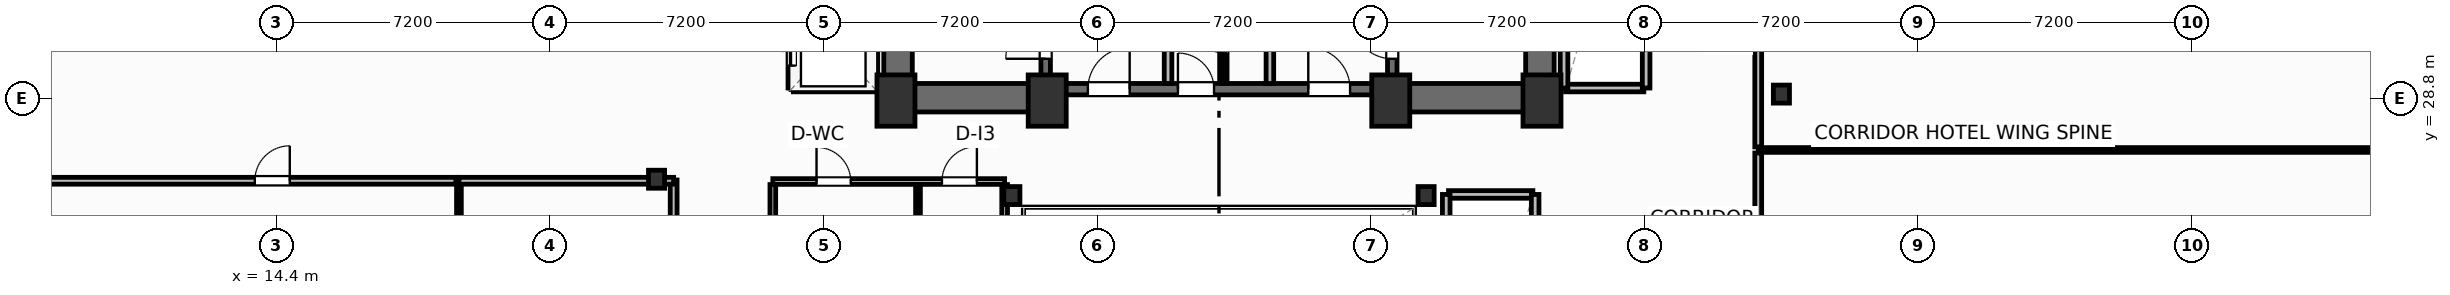
"""IFC4 building model, lengths in metres.
Left out: names, types, materials, properties, quantities, classifications, styles, units other than length and angle.
Written with IfcOpenShell. Run it as: python <this file> out.ifc"""

import sys

from ifc_helpers import new_model, si_unit, direction, frame, frame_2d, origin, origin_2d, place, context, subcontext, project, spatial, rectangle, i_section, extrude, element, fill, save


model = new_model("IFC4")
c1 = context("Model", 3, precision=1e-05, world=origin(), true_north=direction((0.0, 1.0)))
c2 = subcontext(c1, "Body", "Model", "MODEL_VIEW")
j1 = project(units=[si_unit("LENGTHUNIT", "METRE"), si_unit("PLANEANGLEUNIT", "RADIAN")], contexts=[c1])
p1 = place(None, origin())
s1 = spatial("IfcSite", under=j1, at=p1, CompositionType="ELEMENT")
p2 = place(p1, origin())
s2 = spatial("IfcBuilding", under=s1, at=p2, CompositionType="ELEMENT")
p3 = place(p2, frame((0.0, 0.0, 91.0)))
s3 = spatial("IfcBuildingStorey", under=s2, at=p3, CompositionType="ELEMENT", Elevation=91.0)
for number, where, z_axis, x_axis in (
    (1, (30.7, 28.75, 0.0), (0.0, 0.0, 1.0), (1.0, 0.0, 0.0)),
    (2, (34.68, 28.75, 0.0), (0.0, 0.0, 1.0), (1.0, 0.0, 0.0)),
    (3, (43.72, 28.75, 0.0), (0.0, 0.0, 1.0), (1.0, 0.0, 0.0)),
    (4, (47.7, 28.75, 0.0), (0.0, 0.0, 1.0), (1.0, 0.0, 0.0)),
):
    element("IfcColumn", number, at=place(p3, frame(where, z_axis=z_axis, x_axis=x_axis)), inside=s3, PredefinedType="COLUMN", context=c2, shape_type="SweptSolid", body=[
        extrude(rectangle(XDim=1.0, YDim=1.35, at=origin_2d()), origin(), (0.0, 0.0, 1.0), 3.7),
    ])
for number, where, z_axis, x_axis in (
    (5, (33.75, 26.25, 0.0), (0.0, 0.0, 1.0), (1.0, 0.0, 0.0)),
    (6, (44.65, 26.25, 0.0), (0.0, 0.0, 1.0), (1.0, 0.0, 0.0)),
    (7, (24.4, 26.68, 0.0), (0.0, 0.0, 1.0), (1.0, 0.0, 0.0)),
    (8, (54.0, 28.92, 0.0), (0.0, 0.0, 1.0), (1.0, 0.0, 0.0)),
):
    element("IfcColumn", number, at=place(p3, frame(where, z_axis=z_axis, x_axis=x_axis)), inside=s3, PredefinedType="COLUMN", context=c2, shape_type="SweptSolid", body=[
        extrude(i_section(OverallWidth=0.424, OverallDepth=0.474, WebThickness=0.048, FlangeThickness=0.077, FilletRadius=0.025, at=origin_2d()), origin(), (0.0, 0.0, 1.0), 3.7),
    ])
for number, where, z_axis, x_axis in (
    (9, (30.755, 29.2, 0.0), (0.0, 0.0, 1.0), (0.0, 1.0, 0.0)),
    (10, (47.645, 29.2, 0.0), (0.0, 0.0, 1.0), (0.0, 1.0, 0.0)),
):
    element("IfcWall", number, at=place(p3, frame(where, z_axis=z_axis, x_axis=x_axis)), inside=s3, PredefinedType="SHEAR", context=c2, shape_type="SweptSolid", body=[
        extrude(rectangle(XDim=9.22, YDim=0.75, at=frame_2d((4.61, 0.0))), origin(), (0.0, 0.0, 1.0), 3.45),
    ])
p4 = place(p3, frame((30.38, 28.825, 0.0), z_axis=(0.0, 0.0, 1.0), x_axis=(1.0, 0.0, 0.0)))
e11 = element("IfcWall", 11, at=p4, inside=s3, PredefinedType="SHEAR", context=c2, shape_type="SweptSolid", body=[
    extrude(rectangle(XDim=4.42, YDim=0.75, at=frame_2d((2.21, 0.0))), origin(), (0.0, 0.0, 1.0), 3.45),
])
p5 = place(p3, frame((43.6, 28.825, 0.0), z_axis=(0.0, 0.0, 1.0), x_axis=(1.0, 0.0, 0.0)))
e12 = element("IfcWall", 12, at=p5, inside=s3, PredefinedType="SHEAR", context=c2, shape_type="SweptSolid", body=[
    extrude(rectangle(XDim=4.42, YDim=0.75, at=frame_2d((2.21, 0.0))), origin(), (0.0, 0.0, 1.0), 3.45),
])
p6 = place(p3, frame((34.8, 29.05, 0.0), z_axis=(0.0, 0.0, 1.0), x_axis=(1.0, 0.0, 0.0)))
e13 = element("IfcWall", 13, at=p6, inside=s3, PredefinedType="SHEAR", context=c2, shape_type="SweptSolid", body=[
    extrude(rectangle(XDim=8.8, YDim=0.3, at=frame_2d((4.4, 0.0))), origin(), (0.0, 0.0, 1.0), 3.45),
])
p7 = place(p6, frame((0.95, 0.0, 0.0)))
e14 = element("IfcOpeningElement", 14, at=p7, cuts=e13, PredefinedType="OPENING", context=c2, shape_type="SweptSolid", body=[
    extrude(rectangle(XDim=1.1, YDim=2.15, at=frame_2d((0.55, 1.075))), frame((0.0, 0.16, 0.0), z_axis=(0.0, -1.0, 0.0), x_axis=(1.0, 0.0, 0.0)), (0.0, 0.0, 1.0), 0.32),
])
p8 = place(p6, frame((6.75, 0.0, 0.0)))
e15 = element("IfcOpeningElement", 15, at=p8, cuts=e13, PredefinedType="OPENING", context=c2, shape_type="SweptSolid", body=[
    extrude(rectangle(XDim=1.1, YDim=2.15, at=frame_2d((0.55, 1.075))), frame((0.0, 0.16, 0.0), z_axis=(0.0, -1.0, 0.0), x_axis=(1.0, 0.0, 0.0)), (0.0, 0.0, 1.0), 0.32),
])
p9 = place(p6, frame((3.32, 0.0, 0.0)))
e16 = element("IfcOpeningElement", 16, at=p9, cuts=e13, PredefinedType="OPENING", context=c2, shape_type="SweptSolid", body=[
    extrude(rectangle(XDim=0.95, YDim=2.15, at=frame_2d((0.475, 1.075))), frame((0.0, 0.16, 0.0), z_axis=(0.0, -1.0, 0.0), x_axis=(1.0, 0.0, 0.0)), (0.0, 0.0, 1.0), 0.32),
])
p10 = place(p3, frame((34.64, 29.2, 0.0), z_axis=(0.0, 0.0, 1.0), x_axis=(0.0, 1.0, 0.0)))
e17 = element("IfcWall", 17, at=p10, inside=s3, PredefinedType="SHEAR", context=c2, shape_type="SweptSolid", body=[
    extrude(rectangle(XDim=9.22, YDim=0.25, at=frame_2d((4.61, 0.0))), origin(), (0.0, 0.0, 1.0), 3.45),
])
p11 = place(p10, frame((0.65, 0.0, 0.0)))
e18 = element("IfcOpeningElement", 18, at=p11, cuts=e17, PredefinedType="OPENING", context=c2, shape_type="SweptSolid", body=[
    extrude(rectangle(XDim=1.05, YDim=2.15, at=frame_2d((0.525, 1.075))), frame((0.0, 0.135, 0.0), z_axis=(0.0, -1.0, 0.0), x_axis=(1.0, 0.0, 0.0)), (0.0, 0.0, 1.0), 0.27),
])
p12 = place(p3, frame((43.76, 29.2, 0.0), z_axis=(0.0, 0.0, 1.0), x_axis=(0.0, 1.0, 0.0)))
e19 = element("IfcWall", 19, at=p12, inside=s3, PredefinedType="SHEAR", context=c2, shape_type="SweptSolid", body=[
    extrude(rectangle(XDim=9.22, YDim=0.25, at=frame_2d((4.61, 0.0))), origin(), (0.0, 0.0, 1.0), 3.45),
])
p13 = place(p12, frame((0.65, 0.0, 0.0)))
e20 = element("IfcOpeningElement", 20, at=p13, cuts=e19, PredefinedType="OPENING", context=c2, shape_type="SweptSolid", body=[
    extrude(rectangle(XDim=1.05, YDim=2.15, at=frame_2d((0.525, 1.075))), frame((0.0, 0.135, 0.0), z_axis=(0.0, -1.0, 0.0), x_axis=(1.0, 0.0, 0.0)), (0.0, 0.0, 1.0), 0.27),
])
p14 = place(p3, frame((-0.094, 26.64, 0.0), z_axis=(0.0, 0.0, 1.0), x_axis=(1.0, 0.0, 0.0)))
e21 = element("IfcWall", 21, at=p14, inside=s3, PredefinedType="PARTITIONING", context=c2, shape_type="SweptSolid", body=[
    extrude(rectangle(XDim=19.214, YDim=0.18, at=frame_2d((9.607, 0.0))), origin(), (0.0, 0.0, 1.0), 3.45),
])
p15 = place(p14, frame((13.923, 0.0, 0.0)))
e22 = element("IfcOpeningElement", 22, at=p15, cuts=e21, PredefinedType="OPENING", context=c2, shape_type="SweptSolid", body=[
    extrude(rectangle(XDim=0.92, YDim=2.05, at=frame_2d((0.46, 1.025))), frame((0.0, 0.1, 0.0), z_axis=(0.0, -1.0, 0.0), x_axis=(1.0, 0.0, 0.0)), (0.0, 0.0, 1.0), 0.2),
])
p16 = place(p3, frame((24.85, 19.24, 0.0), z_axis=(0.0, 0.0, 1.0), x_axis=(0.0, 1.0, 0.0)))
e23 = element("IfcWall", 23, at=p16, inside=s3, PredefinedType="PARTITIONING", context=c2, shape_type="SweptSolid", body=[
    extrude(rectangle(XDim=7.42, YDim=0.18, at=frame_2d((3.71, 0.0))), origin(), (0.0, 0.0, 1.0), 3.45),
])
p17 = place(p16, frame((2.4, 0.0, 0.0)))
e24 = element("IfcOpeningElement", 24, at=p17, cuts=e23, PredefinedType="OPENING", context=c2, shape_type="SweptSolid", body=[
    extrude(rectangle(XDim=0.92, YDim=2.05, at=frame_2d((0.46, 1.025))), frame((0.0, 0.1, 0.0), z_axis=(0.0, -1.0, 0.0), x_axis=(1.0, 0.0, 0.0)), (0.0, 0.0, 1.0), 0.2),
])
p18 = place(p3, frame((19.2, 19.24, 0.0), z_axis=(0.0, 0.0, 1.0), x_axis=(0.0, 1.0, 0.0)))
e25 = element("IfcWall", 25, at=p18, inside=s3, PredefinedType="PARTITIONING", context=c2, shape_type="SweptSolid", body=[
    extrude(rectangle(XDim=7.42, YDim=0.125, at=frame_2d((3.71, 0.0))), origin(), (0.0, 0.0, 1.0), 3.45),
])
p19 = place(p3, frame((19.2, 26.64, 0.0), z_axis=(0.0, 0.0, 1.0), x_axis=(1.0, 0.0, 0.0)))
e26 = element("IfcWall", 26, at=p19, inside=s3, PredefinedType="PARTITIONING", context=c2, shape_type="SweptSolid", body=[
    extrude(rectangle(XDim=5.65, YDim=0.18, at=frame_2d((2.825, 0.0))), origin(), (0.0, 0.0, 1.0), 2.662),
])
p20 = place(p3, frame((53.39, 19.3, 0.0), z_axis=(0.0, 0.0, 1.0), x_axis=(0.0, 1.0, 0.0)))
e27 = element("IfcWall", 27, at=p20, inside=s3, PredefinedType="PARTITIONING", context=c2, shape_type="SweptSolid", body=[
    extrude(rectangle(XDim=8.07, YDim=0.18, at=frame_2d((4.035, 0.0))), origin(), (0.0, 0.0, 1.0), 3.45),
])
p21 = place(p20, frame((2.2, 0.0, 0.0)))
e28 = element("IfcOpeningElement", 28, at=p21, cuts=e27, PredefinedType="OPENING", context=c2, shape_type="SweptSolid", body=[
    extrude(rectangle(XDim=0.92, YDim=2.05, at=frame_2d((0.46, 1.025))), frame((0.0, 0.1, 0.0), z_axis=(0.0, -1.0, 0.0), x_axis=(1.0, 0.0, 0.0)), (0.0, 0.0, 1.0), 0.2),
])
p22 = place(p3, frame((53.39, 27.53, 0.0), z_axis=(0.0, 0.0, 1.0), x_axis=(0.0, 1.0, 0.0)))
e29 = element("IfcWall", 29, at=p22, inside=s3, PredefinedType="PARTITIONING", context=c2, shape_type="SweptSolid", body=[
    extrude(rectangle(XDim=11.67, YDim=0.18, at=frame_2d((5.835, 0.0))), origin(), (0.0, 0.0, 1.0), 3.45),
])
p23 = place(p22, frame((5.8, 0.0, 0.0)))
e30 = element("IfcOpeningElement", 30, at=p23, cuts=e29, PredefinedType="OPENING", context=c2, shape_type="SweptSolid", body=[
    extrude(rectangle(XDim=0.92, YDim=2.05, at=frame_2d((0.46, 1.025))), frame((0.0, 0.1, 0.0), z_axis=(0.0, -1.0, 0.0), x_axis=(1.0, 0.0, 0.0)), (0.0, 0.0, 1.0), 0.2),
])
p24 = place(p3, frame((53.39, 27.45, 0.0), z_axis=(0.0, 0.0, 1.0), x_axis=(1.0, 0.0, 0.0)))
e31 = element("IfcWall", 31, at=p24, inside=s3, PredefinedType="PARTITIONING", context=c2, shape_type="SweptSolid", body=[
    extrude(rectangle(XDim=23.61, YDim=0.125, at=frame_2d((11.805, 0.0))), origin(), (0.0, 0.0, 1.0), 3.45),
])
for number, where, z_axis, x_axis in (
    (32, (37.86, 29.2, 0.0), (0.0, 0.0, 1.0), (0.0, 1.0, 0.0)),
    (33, (40.54, 29.2, 0.0), (0.0, 0.0, 1.0), (0.0, 1.0, 0.0)),
):
    element("IfcWall", number, at=place(p3, frame(where, z_axis=z_axis, x_axis=x_axis)), inside=s3, PredefinedType="PARTITIONING", context=c2, shape_type="SweptSolid", body=[
        extrude(rectangle(XDim=5.18, YDim=0.2, at=frame_2d((2.59, 0.0))), origin(), (0.0, 0.0, 1.0), 3.45),
    ])
p25 = place(p3, frame((39.35, 29.2, 0.0), z_axis=(0.0, 0.0, 1.0), x_axis=(0.0, 1.0, 0.0)))
e34 = element("IfcWall", 34, at=p25, inside=s3, PredefinedType="PARTITIONING", context=c2, shape_type="SweptSolid", body=[
    extrude(rectangle(XDim=5.22, YDim=0.125, at=frame_2d((2.61, 0.0))), origin(), (0.0, 0.0, 1.0), 3.45),
])
p26 = place(p25, frame((0.8, 0.0, 0.0)))
e35 = element("IfcOpeningElement", 35, at=p26, cuts=e34, PredefinedType="OPENING", context=c2, shape_type="SweptSolid", body=[
    extrude(rectangle(XDim=0.85, YDim=2.05, at=frame_2d((0.425, 1.025))), frame((0.0, 0.073, 0.0), z_axis=(0.0, -1.0, 0.0), x_axis=(1.0, 0.0, 0.0)), (0.0, 0.0, 1.0), 0.145),
])
p27 = place(p25, frame((3.4, 0.0, 0.0)))
e36 = element("IfcOpeningElement", 36, at=p27, cuts=e34, PredefinedType="OPENING", context=c2, shape_type="SweptSolid", body=[
    extrude(rectangle(XDim=0.85, YDim=2.05, at=frame_2d((0.425, 1.025))), frame((0.0, 0.073, 0.0), z_axis=(0.0, -1.0, 0.0), x_axis=(1.0, 0.0, 0.0)), (0.0, 0.0, 1.0), 0.145),
])
p28 = place(p3, frame((27.46, 26.62, 0.0), z_axis=(0.0, 0.0, 1.0), x_axis=(1.0, 0.0, 0.0)))
e37 = element("IfcWall", 37, at=p28, inside=s3, PredefinedType="PARTITIONING", context=c2, shape_type="SweptSolid", body=[
    extrude(rectangle(XDim=6.1, YDim=0.15, at=frame_2d((3.05, 0.0))), origin(), (0.0, 0.0, 1.0), 2.662),
])
p29 = place(p28, frame((1.15, 0.0, 0.0)))
e38 = element("IfcOpeningElement", 38, at=p29, cuts=e37, PredefinedType="OPENING", context=c2, shape_type="SweptSolid", body=[
    extrude(rectangle(XDim=0.9, YDim=2.05, at=frame_2d((0.45, 1.025))), frame((0.0, 0.085, 0.0), z_axis=(0.0, -1.0, 0.0), x_axis=(1.0, 0.0, 0.0)), (0.0, 0.0, 1.0), 0.17),
])
p30 = place(p28, frame((4.45, 0.0, 0.0)))
e39 = element("IfcOpeningElement", 39, at=p30, cuts=e37, PredefinedType="OPENING", context=c2, shape_type="SweptSolid", body=[
    extrude(rectangle(XDim=0.92, YDim=2.05, at=frame_2d((0.46, 1.025))), frame((0.0, 0.085, 0.0), z_axis=(0.0, -1.0, 0.0), x_axis=(1.0, 0.0, 0.0)), (0.0, 0.0, 1.0), 0.17),
])
p31 = place(p3, frame((31.28, 19.38, 0.0), z_axis=(0.0, 0.0, 1.0), x_axis=(0.0, 1.0, 0.0)))
e40 = element("IfcWall", 40, at=p31, inside=s3, PredefinedType="PARTITIONING", context=c2, shape_type="SweptSolid", body=[
    extrude(rectangle(XDim=7.16, YDim=0.125, at=frame_2d((3.58, 0.0))), origin(), (0.0, 0.0, 1.0), 3.45),
])
p32 = place(p3, frame((27.46, 19.38, 0.0), z_axis=(0.0, 0.0, 1.0), x_axis=(0.0, 1.0, 0.0)))
e41 = element("IfcWall", 41, at=p32, inside=s3, PredefinedType="PARTITIONING", context=c2, shape_type="SweptSolid", body=[
    extrude(rectangle(XDim=7.16, YDim=0.15, at=frame_2d((3.58, 0.0))), origin(), (0.0, 0.0, 1.0), 3.45),
])
p33 = place(p32, frame((1.4, 0.0, 0.0)))
e42 = element("IfcOpeningElement", 42, at=p33, cuts=e41, PredefinedType="OPENING", context=c2, shape_type="SweptSolid", body=[
    extrude(rectangle(XDim=0.95, YDim=2.05, at=frame_2d((0.475, 1.025))), frame((0.0, 0.085, 0.0), z_axis=(0.0, -1.0, 0.0), x_axis=(1.0, 0.0, 0.0)), (0.0, 0.0, 1.0), 0.17),
])
p34 = place(p3, frame((33.56, 19.38, 0.0), z_axis=(0.0, 0.0, 1.0), x_axis=(0.0, 1.0, 0.0)))
e43 = element("IfcWall", 43, at=p34, inside=s3, PredefinedType="PARTITIONING", context=c2, shape_type="SweptSolid", body=[
    extrude(rectangle(XDim=7.16, YDim=0.15, at=frame_2d((3.58, 0.0))), origin(), (0.0, 0.0, 1.0), 2.824),
])
p35 = place(p3, frame((28.0, 29.08, 0.0), z_axis=(0.0, 0.0, 1.0), x_axis=(1.0, 0.0, 0.0)))
e44 = element("IfcWall", 44, at=p35, inside=s3, PredefinedType="PARTITIONING", context=c2, shape_type="SweptSolid", body=[
    extrude(rectangle(XDim=2.1, YDim=0.2, at=frame_2d((1.05, 0.0))), origin(), (0.0, 0.0, 1.0), 3.45),
])
p36 = place(p3, frame((30.12, 29.08, 0.0), z_axis=(0.0, 0.0, 1.0), x_axis=(0.0, 1.0, 0.0)))
e45 = element("IfcWall", 45, at=p36, inside=s3, PredefinedType="PARTITIONING", context=c2, shape_type="SweptSolid", body=[
    extrude(rectangle(XDim=6.89, YDim=0.2, at=frame_2d((3.445, 0.0))), origin(), (0.0, 0.0, 1.0), 3.45),
])
p37 = place(p3, frame((27.96, 29.08, 0.0), z_axis=(0.0, 0.0, 1.0), x_axis=(0.0, 1.0, 0.0)))
e46 = element("IfcWall", 46, at=p37, inside=s3, PredefinedType="PARTITIONING", context=c2, shape_type="SweptSolid", body=[
    extrude(rectangle(XDim=6.89, YDim=0.2, at=frame_2d((3.445, 0.0))), origin(), (0.0, 0.0, 1.0), 3.45),
])
p38 = place(p37, frame((0.59, 0.0, 0.0)))
e47 = element("IfcOpeningElement", 47, at=p38, cuts=e46, PredefinedType="OPENING", context=c2, shape_type="SweptSolid", body=[
    extrude(rectangle(XDim=1.1, YDim=2.15, at=frame_2d((0.55, 1.075))), frame((0.0, 0.11, 0.0), z_axis=(0.0, -1.0, 0.0), x_axis=(1.0, 0.0, 0.0)), (0.0, 0.0, 1.0), 0.22),
])
p39 = place(p37, frame((2.89, 0.0, 0.0)))
e48 = element("IfcOpeningElement", 48, at=p39, cuts=e46, PredefinedType="OPENING", context=c2, shape_type="SweptSolid", body=[
    extrude(rectangle(XDim=1.1, YDim=2.15, at=frame_2d((0.55, 1.075))), frame((0.0, 0.11, 0.0), z_axis=(0.0, -1.0, 0.0), x_axis=(1.0, 0.0, 0.0)), (0.0, 0.0, 1.0), 0.22),
])
p40 = place(p37, frame((5.19, 0.0, 0.0)))
e49 = element("IfcOpeningElement", 49, at=p40, cuts=e46, PredefinedType="OPENING", context=c2, shape_type="SweptSolid", body=[
    extrude(rectangle(XDim=1.1, YDim=2.15, at=frame_2d((0.55, 1.075))), frame((0.0, 0.11, 0.0), z_axis=(0.0, -1.0, 0.0), x_axis=(1.0, 0.0, 0.0)), (0.0, 0.0, 1.0), 0.22),
])
p41 = place(p3, frame((48.32, 29.08, 0.0), z_axis=(0.0, 0.0, 1.0), x_axis=(1.0, 0.0, 0.0)))
e50 = element("IfcWall", 50, at=p41, inside=s3, PredefinedType="PARTITIONING", context=c2, shape_type="SweptSolid", body=[
    extrude(rectangle(XDim=2.06, YDim=0.2, at=frame_2d((1.03, 0.0))), origin(), (0.0, 0.0, 1.0), 2.662),
])
for number, where, z_axis, x_axis in (
    (51, (48.28, 29.08, 0.0), (0.0, 0.0, 1.0), (0.0, 1.0, 0.0)),
    (52, (50.44, 29.08, 0.0), (0.0, 0.0, 1.0), (0.0, 1.0, 0.0)),
):
    element("IfcWall", number, at=place(p3, frame(where, z_axis=z_axis, x_axis=x_axis)), inside=s3, PredefinedType="PARTITIONING", context=c2, shape_type="SweptSolid", body=[
        extrude(rectangle(XDim=6.89, YDim=0.2, at=frame_2d((3.445, 0.0))), origin(), (0.0, 0.0, 1.0), 3.45),
    ])
p42 = place(p3, frame((45.24, 26.28, 0.0), z_axis=(0.0, 0.0, 1.0), x_axis=(1.0, 0.0, 0.0)))
e53 = element("IfcWall", 53, at=p42, inside=s3, PredefinedType="PARTITIONING", context=c2, shape_type="SweptSolid", body=[
    extrude(rectangle(XDim=2.22, YDim=0.2, at=frame_2d((1.11, 0.0))), origin(), (0.0, 0.0, 1.0), 3.45),
])
for number, where, z_axis, x_axis in (
    (54, (45.18, 19.38, 0.0), (0.0, 0.0, 1.0), (0.0, 1.0, 0.0)),
    (55, (47.52, 19.38, 0.0), (0.0, 0.0, 1.0), (0.0, 1.0, 0.0)),
):
    element("IfcWall", number, at=place(p3, frame(where, z_axis=z_axis, x_axis=x_axis)), inside=s3, PredefinedType="PARTITIONING", context=c2, shape_type="SweptSolid", body=[
        extrude(rectangle(XDim=6.9, YDim=0.2, at=frame_2d((3.45, 0.0))), origin(), (0.0, 0.0, 1.0), 3.45),
    ])
p43 = place(p15, origin())
e56 = element("IfcDoor", 56, at=p43, inside=s3, OperationType="SINGLE_SWING_RIGHT", PredefinedType="DOOR", context=c2, shape_type="SweptSolid", body=[
    extrude(rectangle(XDim=0.92, YDim=2.05, at=frame_2d((0.46, 1.025))), frame((0.0, 0.025, 0.0), z_axis=(0.0, -1.0, 0.0), x_axis=(1.0, 0.0, 0.0)), (0.0, 0.0, 1.0), 0.05),
])
fill(e22, e56)
p44 = place(p11, origin())
e57 = element("IfcDoor", 57, at=p44, inside=s3, OperationType="SINGLE_SWING_LEFT", PredefinedType="DOOR", context=c2, shape_type="SweptSolid", body=[
    extrude(rectangle(XDim=1.05, YDim=2.15, at=frame_2d((0.525, 1.075))), frame((0.0, 0.025, 0.0), z_axis=(0.0, -1.0, 0.0), x_axis=(1.0, 0.0, 0.0)), (0.0, 0.0, 1.0), 0.05),
])
fill(e18, e57)
p45 = place(p13, origin())
e58 = element("IfcDoor", 58, at=p45, inside=s3, OperationType="SINGLE_SWING_RIGHT", PredefinedType="DOOR", context=c2, shape_type="SweptSolid", body=[
    extrude(rectangle(XDim=1.05, YDim=2.15, at=frame_2d((0.525, 1.075))), frame((0.0, 0.025, 0.0), z_axis=(0.0, -1.0, 0.0), x_axis=(1.0, 0.0, 0.0)), (0.0, 0.0, 1.0), 0.05),
])
fill(e20, e58)
p46 = place(p7, origin())
e59 = element("IfcDoor", 59, at=p46, inside=s3, OperationType="SINGLE_SWING_RIGHT", PredefinedType="DOOR", context=c2, shape_type="SweptSolid", body=[
    extrude(rectangle(XDim=1.1, YDim=2.15, at=frame_2d((0.55, 1.075))), frame((0.0, 0.025, 0.0), z_axis=(0.0, -1.0, 0.0), x_axis=(1.0, 0.0, 0.0)), (0.0, 0.0, 1.0), 0.05),
])
fill(e14, e59)
p47 = place(p8, origin())
e60 = element("IfcDoor", 60, at=p47, inside=s3, OperationType="SINGLE_SWING_LEFT", PredefinedType="DOOR", context=c2, shape_type="SweptSolid", body=[
    extrude(rectangle(XDim=1.1, YDim=2.15, at=frame_2d((0.55, 1.075))), frame((0.0, 0.025, 0.0), z_axis=(0.0, -1.0, 0.0), x_axis=(1.0, 0.0, 0.0)), (0.0, 0.0, 1.0), 0.05),
])
fill(e15, e60)
p48 = place(p26, origin())
e61 = element("IfcDoor", 61, at=p48, inside=s3, OperationType="SINGLE_SWING_RIGHT", PredefinedType="DOOR", context=c2, shape_type="SweptSolid", body=[
    extrude(rectangle(XDim=0.85, YDim=2.05, at=frame_2d((0.425, 1.025))), frame((0.0, 0.025, 0.0), z_axis=(0.0, -1.0, 0.0), x_axis=(1.0, 0.0, 0.0)), (0.0, 0.0, 1.0), 0.05),
])
fill(e35, e61)
p49 = place(p9, origin())
e62 = element("IfcDoor", 62, at=p49, inside=s3, OperationType="SINGLE_SWING_LEFT", PredefinedType="DOOR", context=c2, shape_type="SweptSolid", body=[
    extrude(rectangle(XDim=0.95, YDim=2.15, at=frame_2d((0.475, 1.075))), frame((0.0, 0.025, 0.0), z_axis=(0.0, -1.0, 0.0), x_axis=(1.0, 0.0, 0.0)), (0.0, 0.0, 1.0), 0.05),
])
fill(e16, e62)
p50 = place(p29, origin())
e63 = element("IfcDoor", 63, at=p50, inside=s3, OperationType="SINGLE_SWING_LEFT", PredefinedType="DOOR", context=c2, shape_type="SweptSolid", body=[
    extrude(rectangle(XDim=0.9, YDim=2.05, at=frame_2d((0.45, 1.025))), frame((0.0, 0.025, 0.0), z_axis=(0.0, -1.0, 0.0), x_axis=(1.0, 0.0, 0.0)), (0.0, 0.0, 1.0), 0.05),
])
fill(e38, e63)
p51 = place(p30, origin())
e64 = element("IfcDoor", 64, at=p51, inside=s3, OperationType="SINGLE_SWING_RIGHT", PredefinedType="DOOR", context=c2, shape_type="SweptSolid", body=[
    extrude(rectangle(XDim=0.92, YDim=2.05, at=frame_2d((0.46, 1.025))), frame((0.0, 0.025, 0.0), z_axis=(0.0, -1.0, 0.0), x_axis=(1.0, 0.0, 0.0)), (0.0, 0.0, 1.0), 0.05),
])
fill(e39, e64)
p52 = place(p38, origin())
e65 = element("IfcDoor", 65, at=p52, inside=s3, OperationType="SLIDING_TO_LEFT", PredefinedType="DOOR", context=c2, shape_type="SweptSolid", body=[
    extrude(rectangle(XDim=1.1, YDim=2.15, at=frame_2d((0.55, 1.075))), frame((0.0, 0.025, 0.0), z_axis=(0.0, -1.0, 0.0), x_axis=(1.0, 0.0, 0.0)), (0.0, 0.0, 1.0), 0.05),
])
fill(e47, e65)
save(model, sys.argv[1])
